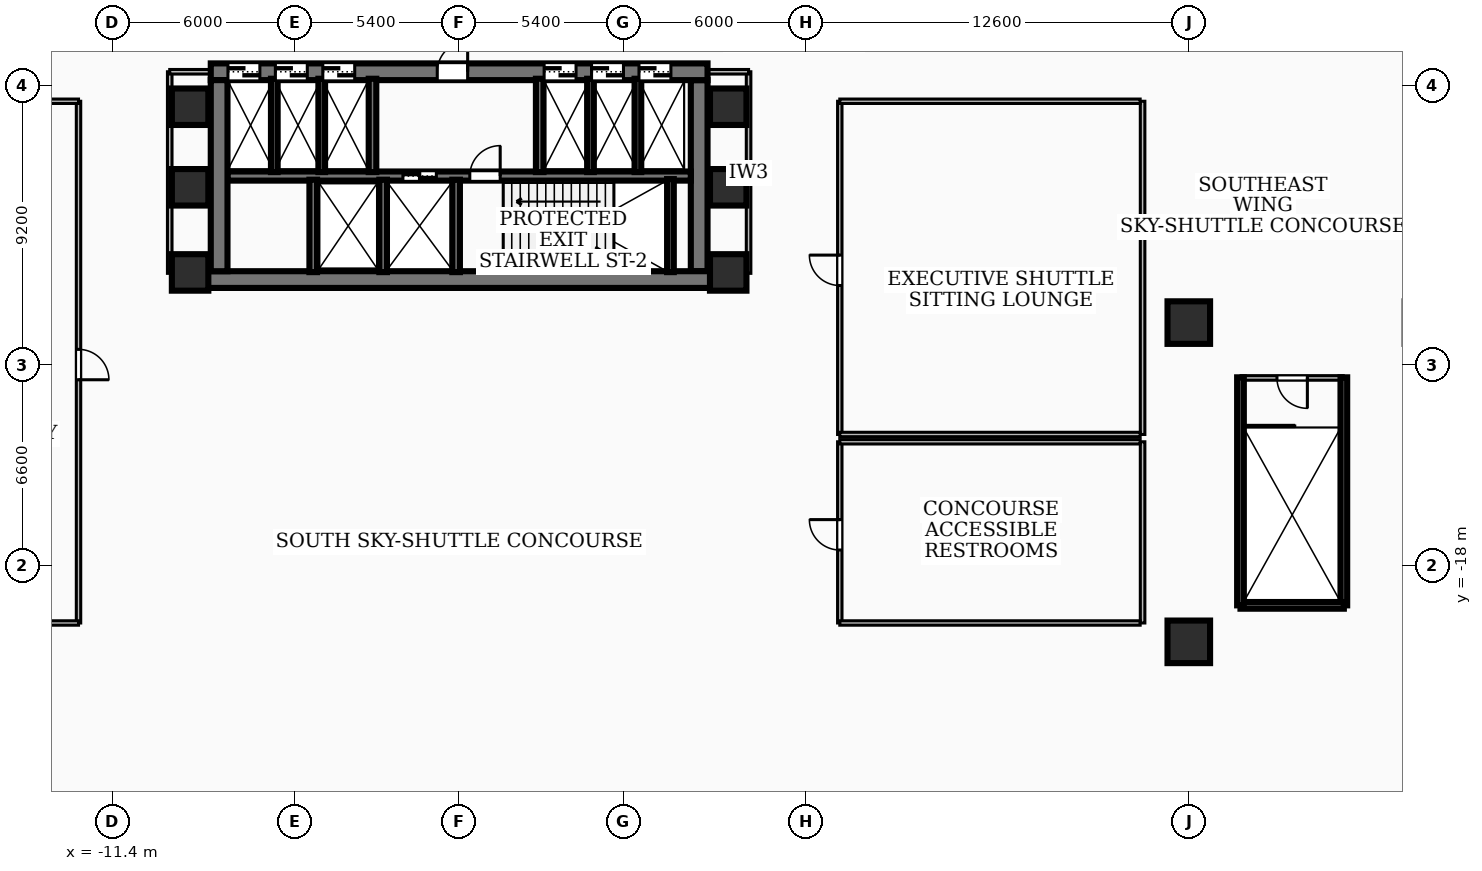
"""IFC4 building model, lengths in metres.
Left out: names, types, materials, properties, quantities, classifications, styles, units other than length and angle.
Written with IfcOpenShell. Run it as: python <this file> out.ifc"""

import sys

from ifc_helpers import new_model, si_unit, direction, frame, frame_2d, origin, origin_2d, place, context, subcontext, project, spatial, rectangle, extrude, element, fill, save


model = new_model("IFC4")
c1 = context("Model", 3, precision=1e-05, world=origin(), true_north=direction((0.0, 1.0)))
c2 = subcontext(c1, "Body", "Model", "MODEL_VIEW")
j1 = project(units=[si_unit("LENGTHUNIT", "METRE"), si_unit("PLANEANGLEUNIT", "RADIAN")], contexts=[c1])
p1 = place(None, origin())
s1 = spatial("IfcSite", under=j1, at=p1, CompositionType="ELEMENT")
p2 = place(p1, origin())
s2 = spatial("IfcBuilding", under=s1, at=p2, CompositionType="ELEMENT")
p3 = place(p2, frame((0.0, 0.0, 19.44)))
s3 = spatial("IfcBuildingStorey", under=s2, at=p3, CompositionType="ELEMENT", Elevation=19.44)
p4 = place(p3, frame((8.78, -8.585, 0.0), z_axis=(0.0, 0.0, 1.0), x_axis=(-1.0, 0.0, 0.0)))
e1 = element("IfcWall", 1, at=p4, inside=s3, PredefinedType="SHEAR", context=c2, shape_type="SweptSolid", body=[
    extrude(rectangle(XDim=17.56, YDim=0.55, at=frame_2d((8.78, 0.0))), origin(), (0.0, 0.0, 1.0), 4.78),
])
p5 = place(p3, frame((-8.17, -1.75, 0.0), z_axis=(0.0, 0.0, 1.0), x_axis=(1.0, 0.0, 0.0)))
e2 = element("IfcWall", 2, at=p5, inside=s3, PredefinedType="SHEAR", context=c2, shape_type="SweptSolid", body=[
    extrude(rectangle(XDim=16.34, YDim=0.55, at=frame_2d((8.17, 0.0))), origin(), (0.0, 0.0, 1.0), 4.78),
])
p6 = place(p5, frame((7.45, 0.0, 0.0)))
e3 = element("IfcOpeningElement", 3, at=p6, cuts=e2, PredefinedType="OPENING", context=c2, shape_type="SweptSolid", body=[
    extrude(rectangle(XDim=1.0, YDim=2.1, at=frame_2d((0.5, 1.05))), frame((0.0, 0.285, 0.0), z_axis=(0.0, -1.0, 0.0), x_axis=(1.0, 0.0, 0.0)), (0.0, 0.0, 1.0), 0.57),
])
p7 = place(p5, frame((10.965, 0.0, 0.0)))
e4 = element("IfcOpeningElement", 4, at=p7, cuts=e2, PredefinedType="OPENING", context=c2, shape_type="SweptSolid", body=[
    extrude(rectangle(XDim=1.05, YDim=2.15, at=frame_2d((0.525, 1.075))), frame((0.0, 0.285, 0.0), z_axis=(0.0, -1.0, 0.0), x_axis=(1.0, 0.0, 0.0)), (0.0, 0.0, 1.0), 0.57),
])
p8 = place(p5, frame((12.525, 0.0, 0.0)))
e5 = element("IfcOpeningElement", 5, at=p8, cuts=e2, PredefinedType="OPENING", context=c2, shape_type="SweptSolid", body=[
    extrude(rectangle(XDim=1.05, YDim=2.15, at=frame_2d((0.525, 1.075))), frame((0.0, 0.285, 0.0), z_axis=(0.0, -1.0, 0.0), x_axis=(1.0, 0.0, 0.0)), (0.0, 0.0, 1.0), 0.57),
])
p9 = place(p5, frame((14.085, 0.0, 0.0)))
e6 = element("IfcOpeningElement", 6, at=p9, cuts=e2, PredefinedType="OPENING", context=c2, shape_type="SweptSolid", body=[
    extrude(rectangle(XDim=1.05, YDim=2.15, at=frame_2d((0.525, 1.075))), frame((0.0, 0.285, 0.0), z_axis=(0.0, -1.0, 0.0), x_axis=(1.0, 0.0, 0.0)), (0.0, 0.0, 1.0), 0.57),
])
p10 = place(p5, frame((0.565, 0.0, 0.0)))
e7 = element("IfcOpeningElement", 7, at=p10, cuts=e2, PredefinedType="OPENING", context=c2, shape_type="SweptSolid", body=[
    extrude(rectangle(XDim=1.05, YDim=2.15, at=frame_2d((0.525, 1.075))), frame((0.0, 0.285, 0.0), z_axis=(0.0, -1.0, 0.0), x_axis=(1.0, 0.0, 0.0)), (0.0, 0.0, 1.0), 0.57),
])
p11 = place(p5, frame((2.125, 0.0, 0.0)))
e8 = element("IfcOpeningElement", 8, at=p11, cuts=e2, PredefinedType="OPENING", context=c2, shape_type="SweptSolid", body=[
    extrude(rectangle(XDim=1.05, YDim=2.15, at=frame_2d((0.525, 1.075))), frame((0.0, 0.285, 0.0), z_axis=(0.0, -1.0, 0.0), x_axis=(1.0, 0.0, 0.0)), (0.0, 0.0, 1.0), 0.57),
])
p12 = place(p5, frame((3.685, 0.0, 0.0)))
e9 = element("IfcOpeningElement", 9, at=p12, cuts=e2, PredefinedType="OPENING", context=c2, shape_type="SweptSolid", body=[
    extrude(rectangle(XDim=1.05, YDim=2.15, at=frame_2d((0.525, 1.075))), frame((0.0, 0.285, 0.0), z_axis=(0.0, -1.0, 0.0), x_axis=(1.0, 0.0, 0.0)), (0.0, 0.0, 1.0), 0.57),
])
for number, where, z_axis, x_axis in (
    (10, (-7.895, -8.31, 0.0), (0.0, 0.0, 1.0), (0.0, 1.0, 0.0)),
    (11, (7.895, -2.025, 0.0), (0.0, 0.0, 1.0), (0.0, -1.0, 0.0)),
):
    element("IfcWall", number, at=place(p3, frame(where, z_axis=z_axis, x_axis=x_axis)), inside=s3, PredefinedType="SHEAR", context=c2, shape_type="SweptSolid", body=[
        extrude(rectangle(XDim=6.285, YDim=0.55, at=frame_2d((3.143, 0.0))), origin(), (0.0, 0.0, 1.0), 4.78),
    ])
p13 = place(p3, frame((-7.62, -5.18, 0.0), z_axis=(0.0, 0.0, 1.0), x_axis=(1.0, 0.0, 0.0)))
e12 = element("IfcWall", 12, at=p13, inside=s3, PredefinedType="SOLIDWALL", context=c2, shape_type="SweptSolid", body=[
    extrude(rectangle(XDim=15.24, YDim=0.3, at=frame_2d((7.62, 0.0))), origin(), (0.0, 0.0, 1.0), 4.78),
])
p14 = place(p13, frame((5.77, 0.0, 0.0)))
e13 = element("IfcOpeningElement", 13, at=p14, cuts=e12, PredefinedType="OPENING", context=c2, shape_type="SweptSolid", body=[
    extrude(rectangle(XDim=1.1, YDim=2.15, at=frame_2d((0.55, 1.075))), frame((0.0, 0.16, 0.0), z_axis=(0.0, -1.0, 0.0), x_axis=(1.0, 0.0, 0.0)), (0.0, 0.0, 1.0), 0.32),
])
p15 = place(p13, frame((7.97, 0.0, 0.0)))
e14 = element("IfcOpeningElement", 14, at=p15, cuts=e12, PredefinedType="OPENING", context=c2, shape_type="SweptSolid", body=[
    extrude(rectangle(XDim=1.0, YDim=2.1, at=frame_2d((0.5, 1.05))), frame((0.0, 0.16, 0.0), z_axis=(0.0, -1.0, 0.0), x_axis=(1.0, 0.0, 0.0)), (0.0, 0.0, 1.0), 0.32),
])
p16 = place(p3, frame((6.95, -8.34, 0.0), z_axis=(0.0, 0.0, 1.0), x_axis=(0.0, 1.0, 0.0)))
e15 = element("IfcWall", 15, at=p16, inside=s3, PredefinedType="SOLIDWALL", context=c2, shape_type="SweptSolid", body=[
    extrude(rectangle(XDim=3.06, YDim=0.22, at=frame_2d((1.53, 0.0))), origin(), (0.0, 0.0, 1.0), 4.78),
])
for number, where, z_axis, x_axis in (
    (16, (-0.1, -8.34, 0.0), (0.0, 0.0, 1.0), (0.0, 1.0, 0.0)),
    (17, (-2.5, -8.34, 0.0), (0.0, 0.0, 1.0), (0.0, 1.0, 0.0)),
    (18, (-4.8, -8.34, 0.0), (0.0, 0.0, 1.0), (0.0, 1.0, 0.0)),
):
    element("IfcWall", number, at=place(p3, frame(where, z_axis=z_axis, x_axis=x_axis)), inside=s3, PredefinedType="SOLIDWALL", context=c2, shape_type="SweptSolid", body=[
        extrude(rectangle(XDim=3.04, YDim=0.25, at=frame_2d((1.52, 0.0))), origin(), (0.0, 0.0, 1.0), 4.78),
    ])
for number, where, z_axis, x_axis in (
    (19, (-2.85, -5.05, 0.0), (0.0, 0.0, 1.0), (0.0, 1.0, 0.0)),
    (20, (2.65, -5.05, 0.0), (0.0, 0.0, 1.0), (0.0, 1.0, 0.0)),
):
    element("IfcWall", number, at=place(p3, frame(where, z_axis=z_axis, x_axis=x_axis)), inside=s3, PredefinedType="SOLIDWALL", context=c2, shape_type="SweptSolid", body=[
        extrude(rectangle(XDim=3.07, YDim=0.25, at=frame_2d((1.535, 0.0))), origin(), (0.0, 0.0, 1.0), 4.78),
    ])
for number, where, z_axis, x_axis in (
    (21, (4.32, -5.05, 0.0), (0.0, 0.0, 1.0), (0.0, 1.0, 0.0)),
    (22, (5.88, -5.05, 0.0), (0.0, 0.0, 1.0), (0.0, 1.0, 0.0)),
    (23, (-6.08, -5.05, 0.0), (0.0, 0.0, 1.0), (0.0, 1.0, 0.0)),
    (24, (-4.52, -5.05, 0.0), (0.0, 0.0, 1.0), (0.0, 1.0, 0.0)),
):
    element("IfcWall", number, at=place(p3, frame(where, z_axis=z_axis, x_axis=x_axis)), inside=s3, PredefinedType="SOLIDWALL", context=c2, shape_type="SweptSolid", body=[
        extrude(rectangle(XDim=3.07, YDim=0.22, at=frame_2d((1.535, 0.0))), origin(), (0.0, 0.0, 1.0), 4.78),
    ])
for number, where, z_axis, x_axis in (
    (25, (25.7, -19.3, 0.0), (0.0, 0.0, 1.0), (0.0, 1.0, 0.0)),
    (26, (29.1, -19.3, 0.0), (0.0, 0.0, 1.0), (0.0, 1.0, 0.0)),
):
    element("IfcWall", number, at=place(p3, frame(where, z_axis=z_axis, x_axis=x_axis)), inside=s3, PredefinedType="SOLIDWALL", context=c2, shape_type="SweptSolid", body=[
        extrude(rectangle(XDim=7.5, YDim=0.22, at=frame_2d((3.75, 0.0))), origin(), (0.0, 0.0, 1.0), 4.78),
    ])
p17 = place(p3, frame((25.7, -19.3, 0.0), z_axis=(0.0, 0.0, 1.0), x_axis=(1.0, 0.0, 0.0)))
e27 = element("IfcWall", 27, at=p17, inside=s3, PredefinedType="SOLIDWALL", context=c2, shape_type="SweptSolid", body=[
    extrude(rectangle(XDim=3.4, YDim=0.22, at=frame_2d((1.7, 0.0))), origin(), (0.0, 0.0, 1.0), 4.78),
])
for number, where, z_axis, x_axis in (
    (28, (-8.85, -5.55, 0.0), (0.0, 0.0, 1.0), (1.0, 0.0, 0.0)),
    (29, (-8.85, -2.9, 0.0), (0.0, 0.0, 1.0), (1.0, 0.0, 0.0)),
    (30, (8.85, -5.55, 0.0), (0.0, 0.0, 1.0), (1.0, 0.0, 0.0)),
    (31, (8.85, -2.9, 0.0), (0.0, 0.0, 1.0), (1.0, 0.0, 0.0)),
    (32, (8.85, -8.35, 0.0), (0.0, 0.0, 1.0), (1.0, 0.0, 0.0)),
    (33, (-8.85, -8.35, 0.0), (0.0, 0.0, 1.0), (1.0, 0.0, 0.0)),
):
    element("IfcColumn", number, at=place(p3, frame(where, z_axis=z_axis, x_axis=x_axis)), inside=s3, PredefinedType="COLUMN", context=c2, shape_type="SweptSolid", body=[
        extrude(rectangle(XDim=1.2, YDim=1.2, at=origin_2d()), origin(), (0.0, 0.0, 1.0), 5.04),
    ])
for number, where, z_axis, x_axis in (
    (34, (24.0, -10.0, 0.0), (0.0, 0.0, 1.0), (1.0, 0.0, 0.0)),
    (35, (24.0, -20.5, 0.0), (0.0, 0.0, 1.0), (1.0, 0.0, 0.0)),
):
    element("IfcColumn", number, at=place(p3, frame(where, z_axis=z_axis, x_axis=x_axis)), inside=s3, PredefinedType="COLUMN", context=c2, shape_type="SweptSolid", body=[
        extrude(rectangle(XDim=1.4, YDim=1.4, at=origin_2d()), origin(), (0.0, 0.0, 1.0), 5.04),
    ])
p18 = place(p3, frame((29.08, -11.82, 0.0), z_axis=(0.0, 0.0, 1.0), x_axis=(-1.0, 0.0, 0.0)))
e36 = element("IfcWall", 36, at=p18, inside=s3, PredefinedType="PARTITIONING", context=c2, shape_type="SweptSolid", body=[
    extrude(rectangle(XDim=3.36, YDim=0.15, at=frame_2d((1.68, 0.0))), origin(), (0.0, 0.0, 1.0), 4.78),
])
p19 = place(p18, frame((1.18, 0.0, 0.0)))
e37 = element("IfcOpeningElement", 37, at=p19, cuts=e36, PredefinedType="OPENING", context=c2, shape_type="SweptSolid", body=[
    extrude(rectangle(XDim=1.0, YDim=2.1, at=frame_2d((0.5, 1.05))), frame((0.0, 0.085, 0.0), z_axis=(0.0, -1.0, 0.0), x_axis=(1.0, 0.0, 0.0)), (0.0, 0.0, 1.0), 0.17),
])
p20 = place(p3, frame((-9.52, -8.38, 0.0), z_axis=(0.0, 0.0, 1.0), x_axis=(0.0, 1.0, 0.0)))
e38 = element("IfcWall", 38, at=p20, inside=s3, PredefinedType="PARTITIONING", context=c2, shape_type="SweptSolid", body=[
    extrude(rectangle(XDim=6.63, YDim=0.15, at=frame_2d((3.315, 0.0))), origin(), (0.0, 0.0, 1.0), 2.572),
])
p21 = place(p3, frame((-7.85, -1.75, 0.0), z_axis=(0.0, 0.0, 1.0), x_axis=(-1.0, 0.0, 0.0)))
e39 = element("IfcWall", 39, at=p21, inside=s3, PredefinedType="PARTITIONING", context=c2, shape_type="SweptSolid", body=[
    extrude(rectangle(XDim=1.67, YDim=0.15, at=frame_2d((0.835, 0.0))), origin(), (0.0, 0.0, 1.0), 3.845),
])
p22 = place(p3, frame((9.52, -8.38, 0.0), z_axis=(0.0, 0.0, 1.0), x_axis=(0.0, 1.0, 0.0)))
e40 = element("IfcWall", 40, at=p22, inside=s3, PredefinedType="PARTITIONING", context=c2, shape_type="SweptSolid", body=[
    extrude(rectangle(XDim=6.63, YDim=0.15, at=frame_2d((3.315, 0.0))), origin(), (0.0, 0.0, 1.0), 2.572),
])
p23 = place(p3, frame((7.85, -1.75, 0.0), z_axis=(0.0, 0.0, 1.0), x_axis=(1.0, 0.0, 0.0)))
e41 = element("IfcWall", 41, at=p23, inside=s3, PredefinedType="PARTITIONING", context=c2, shape_type="SweptSolid", body=[
    extrude(rectangle(XDim=1.67, YDim=0.15, at=frame_2d((0.835, 0.0))), origin(), (0.0, 0.0, 1.0), 3.845),
])
p24 = place(p3, frame((-12.52, -2.72, 0.0), z_axis=(0.0, 0.0, 1.0), x_axis=(0.0, -1.0, 0.0)))
e42 = element("IfcWall", 42, at=p24, inside=s3, PredefinedType="PARTITIONING", context=c2, shape_type="SweptSolid", body=[
    extrude(rectangle(XDim=17.16, YDim=0.145, at=frame_2d((8.58, 0.0))), origin(), (0.0, 0.0, 1.0), 2.572),
])
p25 = place(p24, frame((8.16, 0.0, 0.0)))
e43 = element("IfcOpeningElement", 43, at=p25, cuts=e42, PredefinedType="OPENING", context=c2, shape_type="SweptSolid", body=[
    extrude(rectangle(XDim=1.0, YDim=2.1, at=frame_2d((0.5, 1.05))), frame((0.0, 0.083, 0.0), z_axis=(0.0, -1.0, 0.0), x_axis=(1.0, 0.0, 0.0)), (0.0, 0.0, 1.0), 0.165),
])
p26 = place(p3, frame((-22.4, -19.88, 0.0), z_axis=(0.0, 0.0, 1.0), x_axis=(1.0, 0.0, 0.0)))
e44 = element("IfcWall", 44, at=p26, inside=s3, PredefinedType="PARTITIONING", context=c2, shape_type="SweptSolid", body=[
    extrude(rectangle(XDim=9.88, YDim=0.145, at=frame_2d((4.94, 0.0))), origin(), (0.0, 0.0, 1.0), 4.78),
])
p27 = place(p3, frame((-22.4, -2.72, 0.0), z_axis=(0.0, 0.0, 1.0), x_axis=(1.0, 0.0, 0.0)))
e45 = element("IfcWall", 45, at=p27, inside=s3, PredefinedType="PARTITIONING", context=c2, shape_type="SweptSolid", body=[
    extrude(rectangle(XDim=9.88, YDim=0.145, at=frame_2d((4.94, 0.0))), origin(), (0.0, 0.0, 1.0), 2.572),
])
p28 = place(p3, frame((12.52, -13.68, 0.0), z_axis=(0.0, 0.0, 1.0), x_axis=(0.0, 1.0, 0.0)))
e46 = element("IfcWall", 46, at=p28, inside=s3, PredefinedType="PARTITIONING", context=c2, shape_type="SweptSolid", body=[
    extrude(rectangle(XDim=10.96, YDim=0.145, at=frame_2d((5.48, 0.0))), origin(), (0.0, 0.0, 1.0), 2.572),
])
p29 = place(p28, frame((4.9, 0.0, 0.0)))
e47 = element("IfcOpeningElement", 47, at=p29, cuts=e46, PredefinedType="OPENING", context=c2, shape_type="SweptSolid", body=[
    extrude(rectangle(XDim=1.0, YDim=2.1, at=frame_2d((0.5, 1.05))), frame((0.0, 0.083, 0.0), z_axis=(0.0, -1.0, 0.0), x_axis=(1.0, 0.0, 0.0)), (0.0, 0.0, 1.0), 0.165),
])
p30 = place(p3, frame((12.52, -13.68, 0.0), z_axis=(0.0, 0.0, 1.0), x_axis=(1.0, 0.0, 0.0)))
e48 = element("IfcWall", 48, at=p30, inside=s3, PredefinedType="PARTITIONING", context=c2, shape_type="SweptSolid", body=[
    extrude(rectangle(XDim=9.88, YDim=0.145, at=frame_2d((4.94, 0.0))), origin(), (0.0, 0.0, 1.0), 4.78),
])
p31 = place(p3, frame((12.52, -2.72, 0.0), z_axis=(0.0, 0.0, 1.0), x_axis=(1.0, 0.0, 0.0)))
e49 = element("IfcWall", 49, at=p31, inside=s3, PredefinedType="PARTITIONING", context=c2, shape_type="SweptSolid", body=[
    extrude(rectangle(XDim=9.88, YDim=0.145, at=frame_2d((4.94, 0.0))), origin(), (0.0, 0.0, 1.0), 2.572),
])
p32 = place(p3, frame((22.48, -13.68, 0.0), z_axis=(0.0, 0.0, 1.0), x_axis=(0.0, 1.0, 0.0)))
e50 = element("IfcWall", 50, at=p32, inside=s3, PredefinedType="PARTITIONING", context=c2, shape_type="SweptSolid", body=[
    extrude(rectangle(XDim=10.96, YDim=0.15, at=frame_2d((5.48, 0.0))), origin(), (0.0, 0.0, 1.0), 2.572),
])
p33 = place(p3, frame((12.52, -19.88, 0.0), z_axis=(0.0, 0.0, 1.0), x_axis=(0.0, 1.0, 0.0)))
e51 = element("IfcWall", 51, at=p33, inside=s3, PredefinedType="PARTITIONING", context=c2, shape_type="SweptSolid", body=[
    extrude(rectangle(XDim=5.96, YDim=0.145, at=frame_2d((2.98, 0.0))), origin(), (0.0, 0.0, 1.0), 4.78),
])
p34 = place(p33, frame((2.4, 0.0, 0.0)))
e52 = element("IfcOpeningElement", 52, at=p34, cuts=e51, PredefinedType="OPENING", context=c2, shape_type="SweptSolid", body=[
    extrude(rectangle(XDim=1.0, YDim=2.1, at=frame_2d((0.5, 1.05))), frame((0.0, 0.083, 0.0), z_axis=(0.0, -1.0, 0.0), x_axis=(1.0, 0.0, 0.0)), (0.0, 0.0, 1.0), 0.165),
])
for number, where, z_axis, x_axis in (
    (53, (12.52, -19.88, 0.0), (0.0, 0.0, 1.0), (1.0, 0.0, 0.0)),
    (54, (12.52, -13.92, 0.0), (0.0, 0.0, 1.0), (1.0, 0.0, 0.0)),
):
    element("IfcWall", number, at=place(p3, frame(where, z_axis=z_axis, x_axis=x_axis)), inside=s3, PredefinedType="PARTITIONING", context=c2, shape_type="SweptSolid", body=[
        extrude(rectangle(XDim=9.88, YDim=0.145, at=frame_2d((4.94, 0.0))), origin(), (0.0, 0.0, 1.0), 4.78),
    ])
p35 = place(p3, frame((22.48, -19.88, 0.0), z_axis=(0.0, 0.0, 1.0), x_axis=(0.0, 1.0, 0.0)))
e55 = element("IfcWall", 55, at=p35, inside=s3, PredefinedType="PARTITIONING", context=c2, shape_type="SweptSolid", body=[
    extrude(rectangle(XDim=5.96, YDim=0.15, at=frame_2d((2.98, 0.0))), origin(), (0.0, 0.0, 1.0), 4.78),
])
p36 = place(p19, origin())
e56 = element("IfcDoor", 56, at=p36, inside=s3, OperationType="SINGLE_SWING_LEFT", PredefinedType="DOOR", context=c2, shape_type="SweptSolid", body=[
    extrude(rectangle(XDim=1.0, YDim=2.1, at=frame_2d((0.5, 1.05))), frame((0.0, 0.025, 0.0), z_axis=(0.0, -1.0, 0.0), x_axis=(1.0, 0.0, 0.0)), (0.0, 0.0, 1.0), 0.05),
])
fill(e37, e56)
p37 = place(p6, origin())
e57 = element("IfcDoor", 57, at=p37, inside=s3, OperationType="SINGLE_SWING_RIGHT", PredefinedType="DOOR", context=c2, shape_type="SweptSolid", body=[
    extrude(rectangle(XDim=1.0, YDim=2.1, at=frame_2d((0.5, 1.05))), frame((0.0, 0.025, 0.0), z_axis=(0.0, -1.0, 0.0), x_axis=(1.0, 0.0, 0.0)), (0.0, 0.0, 1.0), 0.05),
])
fill(e3, e57)
p38 = place(p14, origin())
e58 = element("IfcDoor", 58, at=p38, inside=s3, OperationType="DOUBLE_DOOR_SLIDING", PredefinedType="DOOR", context=c2, shape_type="SweptSolid", body=[
    extrude(rectangle(XDim=1.1, YDim=2.15, at=frame_2d((0.55, 1.075))), frame((0.0, 0.025, 0.0), z_axis=(0.0, -1.0, 0.0), x_axis=(1.0, 0.0, 0.0)), (0.0, 0.0, 1.0), 0.05),
])
fill(e13, e58)
p39 = place(p15, origin())
e59 = element("IfcDoor", 59, at=p39, inside=s3, OperationType="SINGLE_SWING_RIGHT", PredefinedType="DOOR", context=c2, shape_type="SweptSolid", body=[
    extrude(rectangle(XDim=1.0, YDim=2.1, at=frame_2d((0.5, 1.05))), frame((0.0, 0.025, 0.0), z_axis=(0.0, -1.0, 0.0), x_axis=(1.0, 0.0, 0.0)), (0.0, 0.0, 1.0), 0.05),
])
fill(e14, e59)
p40 = place(p7, origin())
e60 = element("IfcDoor", 60, at=p40, inside=s3, OperationType="DOUBLE_DOOR_SLIDING", PredefinedType="DOOR", context=c2, shape_type="SweptSolid", body=[
    extrude(rectangle(XDim=1.05, YDim=2.15, at=frame_2d((0.525, 1.075))), frame((0.0, 0.025, 0.0), z_axis=(0.0, -1.0, 0.0), x_axis=(1.0, 0.0, 0.0)), (0.0, 0.0, 1.0), 0.05),
])
fill(e4, e60)
p41 = place(p8, origin())
e61 = element("IfcDoor", 61, at=p41, inside=s3, OperationType="DOUBLE_DOOR_SLIDING", PredefinedType="DOOR", context=c2, shape_type="SweptSolid", body=[
    extrude(rectangle(XDim=1.05, YDim=2.15, at=frame_2d((0.525, 1.075))), frame((0.0, 0.025, 0.0), z_axis=(0.0, -1.0, 0.0), x_axis=(1.0, 0.0, 0.0)), (0.0, 0.0, 1.0), 0.05),
])
fill(e5, e61)
p42 = place(p9, origin())
e62 = element("IfcDoor", 62, at=p42, inside=s3, OperationType="DOUBLE_DOOR_SLIDING", PredefinedType="DOOR", context=c2, shape_type="SweptSolid", body=[
    extrude(rectangle(XDim=1.05, YDim=2.15, at=frame_2d((0.525, 1.075))), frame((0.0, 0.025, 0.0), z_axis=(0.0, -1.0, 0.0), x_axis=(1.0, 0.0, 0.0)), (0.0, 0.0, 1.0), 0.05),
])
fill(e6, e62)
p43 = place(p10, origin())
e63 = element("IfcDoor", 63, at=p43, inside=s3, OperationType="DOUBLE_DOOR_SLIDING", PredefinedType="DOOR", context=c2, shape_type="SweptSolid", body=[
    extrude(rectangle(XDim=1.05, YDim=2.15, at=frame_2d((0.525, 1.075))), frame((0.0, 0.025, 0.0), z_axis=(0.0, -1.0, 0.0), x_axis=(1.0, 0.0, 0.0)), (0.0, 0.0, 1.0), 0.05),
])
fill(e7, e63)
p44 = place(p11, origin())
e64 = element("IfcDoor", 64, at=p44, inside=s3, OperationType="DOUBLE_DOOR_SLIDING", PredefinedType="DOOR", context=c2, shape_type="SweptSolid", body=[
    extrude(rectangle(XDim=1.05, YDim=2.15, at=frame_2d((0.525, 1.075))), frame((0.0, 0.025, 0.0), z_axis=(0.0, -1.0, 0.0), x_axis=(1.0, 0.0, 0.0)), (0.0, 0.0, 1.0), 0.05),
])
fill(e8, e64)
p45 = place(p12, origin())
e65 = element("IfcDoor", 65, at=p45, inside=s3, OperationType="DOUBLE_DOOR_SLIDING", PredefinedType="DOOR", context=c2, shape_type="SweptSolid", body=[
    extrude(rectangle(XDim=1.05, YDim=2.15, at=frame_2d((0.525, 1.075))), frame((0.0, 0.025, 0.0), z_axis=(0.0, -1.0, 0.0), x_axis=(1.0, 0.0, 0.0)), (0.0, 0.0, 1.0), 0.05),
])
fill(e9, e65)
p46 = place(p25, origin())
e66 = element("IfcDoor", 66, at=p46, inside=s3, OperationType="SINGLE_SWING_RIGHT", PredefinedType="DOOR", context=c2, shape_type="SweptSolid", body=[
    extrude(rectangle(XDim=1.0, YDim=2.1, at=frame_2d((0.5, 1.05))), frame((0.0, 0.025, 0.0), z_axis=(0.0, -1.0, 0.0), x_axis=(1.0, 0.0, 0.0)), (0.0, 0.0, 1.0), 0.05),
])
fill(e43, e66)
p47 = place(p29, origin())
e67 = element("IfcDoor", 67, at=p47, inside=s3, OperationType="SINGLE_SWING_RIGHT", PredefinedType="DOOR", context=c2, shape_type="SweptSolid", body=[
    extrude(rectangle(XDim=1.0, YDim=2.1, at=frame_2d((0.5, 1.05))), frame((0.0, 0.025, 0.0), z_axis=(0.0, -1.0, 0.0), x_axis=(1.0, 0.0, 0.0)), (0.0, 0.0, 1.0), 0.05),
])
fill(e47, e67)
p48 = place(p34, origin())
e68 = element("IfcDoor", 68, at=p48, inside=s3, OperationType="SINGLE_SWING_RIGHT", PredefinedType="DOOR", context=c2, shape_type="SweptSolid", body=[
    extrude(rectangle(XDim=1.0, YDim=2.1, at=frame_2d((0.5, 1.05))), frame((0.0, 0.025, 0.0), z_axis=(0.0, -1.0, 0.0), x_axis=(1.0, 0.0, 0.0)), (0.0, 0.0, 1.0), 0.05),
])
fill(e52, e68)
save(model, sys.argv[1])
